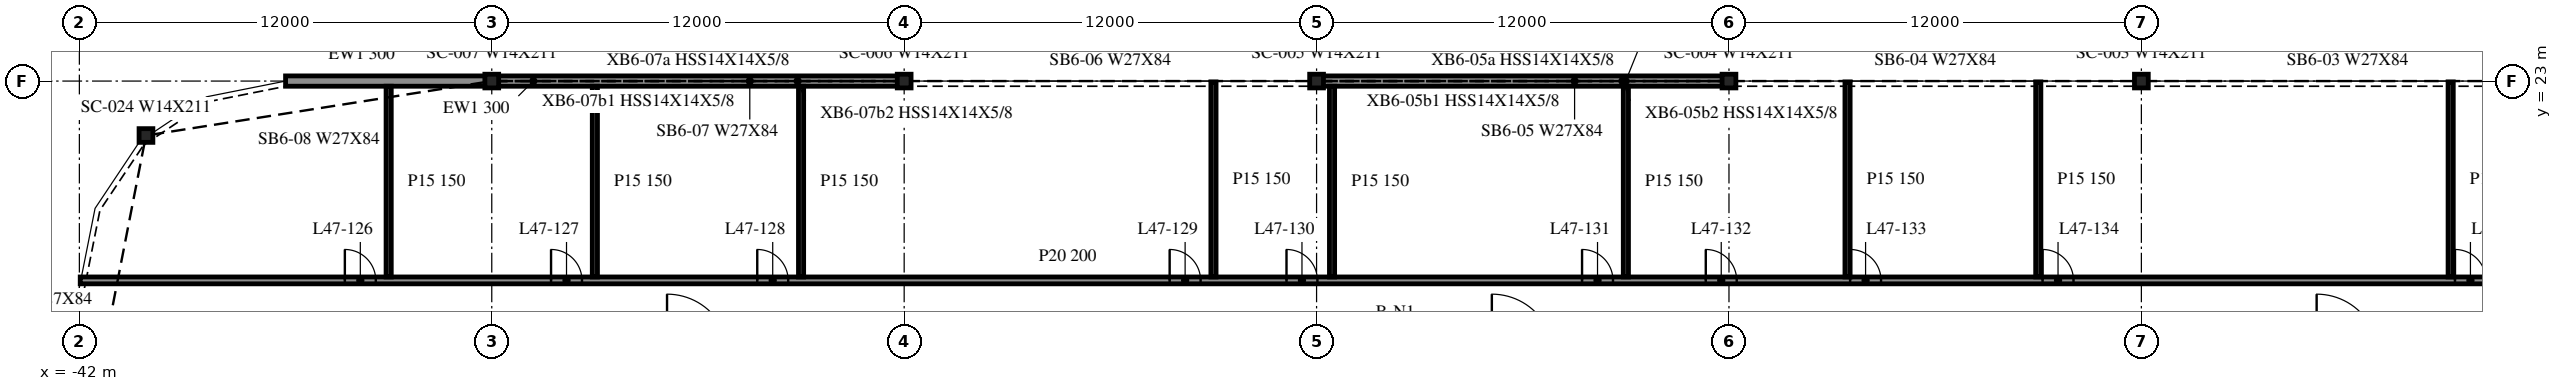
"""IFC4 building model, lengths in metres.
Left out: names, types, materials, properties, quantities, classifications, styles, units other than length and angle.
Written with IfcOpenShell. Run it as: python <this file> out.ifc"""

import sys

from ifc_helpers import new_model, si_unit, direction, frame, frame_2d, origin, origin_2d, place, context, subcontext, project, spatial, rectangle, i_section, extrude, element, fill, save


model = new_model("IFC4")
c1 = context("Model", 3, precision=1e-05, world=origin(), true_north=direction((0.0, 1.0)))
c2 = subcontext(c1, "Body", "Model", "MODEL_VIEW")
j1 = project(units=[si_unit("LENGTHUNIT", "METRE"), si_unit("PLANEANGLEUNIT", "RADIAN")], contexts=[c1])
p1 = place(None, origin())
s1 = spatial("IfcSite", under=j1, at=p1, CompositionType="ELEMENT")
p2 = place(p1, origin())
s2 = spatial("IfcBuilding", under=s1, at=p2, CompositionType="ELEMENT")
p3 = place(p2, frame((0.0, 0.0, 197.7)))
s3 = spatial("IfcBuildingStorey", under=s2, at=p3, CompositionType="ELEMENT", Elevation=197.7)
for number, where, z_axis, x_axis in (
    (1, (18.0, 23.0, -0.34), (0.0, 0.0, 1.0), (1.0, 0.0, 0.0)),
    (2, (6.0, 23.0, -0.34), (0.0, 0.0, 1.0), (1.0, 0.0, 0.0)),
    (3, (-6.0, 23.0, -0.34), (0.0, 0.0, 1.0), (1.0, 0.0, 0.0)),
    (4, (-18.0, 23.0, -0.34), (0.0, 0.0, 1.0), (1.0, 0.0, 0.0)),
    (5, (-30.0, 23.0, -0.34), (0.0, 0.0, 1.0), (1.0, 0.0, 0.0)),
    (6, (-40.062, 21.416, -0.34), (0.0, 0.0, 1.0), (1.0, 0.0, 0.0)),
):
    element("IfcColumn", number, at=place(p3, frame(where, z_axis=z_axis, x_axis=x_axis)), inside=s3, PredefinedType="COLUMN", context=c2, shape_type="SweptSolid", body=[
        extrude(i_section(OverallWidth=0.401, OverallDepth=0.399, WebThickness=0.025, FlangeThickness=0.04, at=origin_2d()), origin(), (0.0, 0.0, 1.0), 3.8),
    ])
for number, where, z_axis, x_axis in (
    (7, (5.988, 23.0, 0.0), (0.0, 0.0, 1.0), (-1.0, 0.0, 0.0)),
    (8, (-18.012, 23.0, 0.0), (0.0, 0.0, 1.0), (-1.0, 0.0, 0.0)),
):
    element("IfcWall", number, at=place(p3, frame(where, z_axis=z_axis, x_axis=x_axis)), inside=s3, PredefinedType="NOTDEFINED", context=c2, shape_type="SweptSolid", body=[
        extrude(rectangle(XDim=11.975, YDim=0.3, at=frame_2d((5.988, 0.0))), origin(), (0.0, 0.0, 1.0), 2.782),
    ])
p4 = place(p3, frame((-30.012, 23.0, 0.0), z_axis=(0.0, 0.0, 1.0), x_axis=(-1.0, 0.0, 0.0)))
e9 = element("IfcWall", 9, at=p4, inside=s3, PredefinedType="NOTDEFINED", context=c2, shape_type="SweptSolid", body=[
    extrude(rectangle(XDim=5.988, YDim=0.3, at=frame_2d((2.994, 0.0))), origin(), (0.0, 0.0, 1.0), 2.782),
])
p5 = place(p3, frame((-41.975, 17.2, 0.0), z_axis=(0.0, 0.0, 1.0), x_axis=(1.0, 0.0, 0.0)))
e10 = element("IfcWall", 10, at=p5, inside=s3, PredefinedType="PARTITIONING", context=c2, shape_type="SweptSolid", body=[
    extrude(rectangle(XDim=95.782, YDim=0.2, at=frame_2d((47.891, 0.0))), origin(), (0.0, 0.0, 1.0), 3.46),
])
p6 = place(p5, frame((7.7, 0.0, 0.0)))
e11 = element("IfcOpeningElement", 11, at=p6, cuts=e10, PredefinedType="OPENING", context=c2, shape_type="SweptSolid", body=[
    extrude(rectangle(XDim=0.9, YDim=2.1, at=frame_2d((0.45, 1.05))), frame((0.0, 0.11, 0.0), z_axis=(0.0, -1.0, 0.0), x_axis=(1.0, 0.0, 0.0)), (0.0, 0.0, 1.0), 0.22),
])
p7 = place(p5, frame((13.7, 0.0, 0.0)))
e12 = element("IfcOpeningElement", 12, at=p7, cuts=e10, PredefinedType="OPENING", context=c2, shape_type="SweptSolid", body=[
    extrude(rectangle(XDim=0.9, YDim=2.1, at=frame_2d((0.45, 1.05))), frame((0.0, 0.11, 0.0), z_axis=(0.0, -1.0, 0.0), x_axis=(1.0, 0.0, 0.0)), (0.0, 0.0, 1.0), 0.22),
])
p8 = place(p5, frame((19.7, 0.0, 0.0)))
e13 = element("IfcOpeningElement", 13, at=p8, cuts=e10, PredefinedType="OPENING", context=c2, shape_type="SweptSolid", body=[
    extrude(rectangle(XDim=0.9, YDim=2.1, at=frame_2d((0.45, 1.05))), frame((0.0, 0.11, 0.0), z_axis=(0.0, -1.0, 0.0), x_axis=(1.0, 0.0, 0.0)), (0.0, 0.0, 1.0), 0.22),
])
p9 = place(p5, frame((31.7, 0.0, 0.0)))
e14 = element("IfcOpeningElement", 14, at=p9, cuts=e10, PredefinedType="OPENING", context=c2, shape_type="SweptSolid", body=[
    extrude(rectangle(XDim=0.9, YDim=2.1, at=frame_2d((0.45, 1.05))), frame((0.0, 0.11, 0.0), z_axis=(0.0, -1.0, 0.0), x_axis=(1.0, 0.0, 0.0)), (0.0, 0.0, 1.0), 0.22),
])
p10 = place(p5, frame((35.1, 0.0, 0.0)))
e15 = element("IfcOpeningElement", 15, at=p10, cuts=e10, PredefinedType="OPENING", context=c2, shape_type="SweptSolid", body=[
    extrude(rectangle(XDim=0.9, YDim=2.1, at=frame_2d((0.45, 1.05))), frame((0.0, 0.11, 0.0), z_axis=(0.0, -1.0, 0.0), x_axis=(1.0, 0.0, 0.0)), (0.0, 0.0, 1.0), 0.22),
])
p11 = place(p5, frame((43.7, 0.0, 0.0)))
e16 = element("IfcOpeningElement", 16, at=p11, cuts=e10, PredefinedType="OPENING", context=c2, shape_type="SweptSolid", body=[
    extrude(rectangle(XDim=0.9, YDim=2.1, at=frame_2d((0.45, 1.05))), frame((0.0, 0.11, 0.0), z_axis=(0.0, -1.0, 0.0), x_axis=(1.0, 0.0, 0.0)), (0.0, 0.0, 1.0), 0.22),
])
p12 = place(p5, frame((47.3, 0.0, 0.0)))
e17 = element("IfcOpeningElement", 17, at=p12, cuts=e10, PredefinedType="OPENING", context=c2, shape_type="SweptSolid", body=[
    extrude(rectangle(XDim=0.9, YDim=2.1, at=frame_2d((0.45, 1.05))), frame((0.0, 0.11, 0.0), z_axis=(0.0, -1.0, 0.0), x_axis=(1.0, 0.0, 0.0)), (0.0, 0.0, 1.0), 0.22),
])
p13 = place(p5, frame((51.5, 0.0, 0.0)))
e18 = element("IfcOpeningElement", 18, at=p13, cuts=e10, PredefinedType="OPENING", context=c2, shape_type="SweptSolid", body=[
    extrude(rectangle(XDim=0.9, YDim=2.1, at=frame_2d((0.45, 1.05))), frame((0.0, 0.11, 0.0), z_axis=(0.0, -1.0, 0.0), x_axis=(1.0, 0.0, 0.0)), (0.0, 0.0, 1.0), 0.22),
])
p14 = place(p5, frame((57.1, 0.0, 0.0)))
e19 = element("IfcOpeningElement", 19, at=p14, cuts=e10, PredefinedType="OPENING", context=c2, shape_type="SweptSolid", body=[
    extrude(rectangle(XDim=0.9, YDim=2.1, at=frame_2d((0.45, 1.05))), frame((0.0, 0.11, 0.0), z_axis=(0.0, -1.0, 0.0), x_axis=(1.0, 0.0, 0.0)), (0.0, 0.0, 1.0), 0.22),
])
p15 = place(p5, frame((69.1, 0.0, 0.0)))
e20 = element("IfcOpeningElement", 20, at=p15, cuts=e10, PredefinedType="OPENING", context=c2, shape_type="SweptSolid", body=[
    extrude(rectangle(XDim=0.9, YDim=2.1, at=frame_2d((0.45, 1.05))), frame((0.0, 0.11, 0.0), z_axis=(0.0, -1.0, 0.0), x_axis=(1.0, 0.0, 0.0)), (0.0, 0.0, 1.0), 0.22),
])
p16 = place(p5, frame((72.5, 0.0, 0.0)))
e21 = element("IfcOpeningElement", 21, at=p16, cuts=e10, PredefinedType="OPENING", context=c2, shape_type="SweptSolid", body=[
    extrude(rectangle(XDim=0.9, YDim=2.1, at=frame_2d((0.45, 1.05))), frame((0.0, 0.11, 0.0), z_axis=(0.0, -1.0, 0.0), x_axis=(1.0, 0.0, 0.0)), (0.0, 0.0, 1.0), 0.22),
])
p17 = place(p5, frame((81.1, 0.0, 0.0)))
e22 = element("IfcOpeningElement", 22, at=p17, cuts=e10, PredefinedType="OPENING", context=c2, shape_type="SweptSolid", body=[
    extrude(rectangle(XDim=0.9, YDim=2.1, at=frame_2d((0.45, 1.05))), frame((0.0, 0.11, 0.0), z_axis=(0.0, -1.0, 0.0), x_axis=(1.0, 0.0, 0.0)), (0.0, 0.0, 1.0), 0.22),
])
p18 = place(p5, frame((87.1, 0.0, 0.0)))
e23 = element("IfcOpeningElement", 23, at=p18, cuts=e10, PredefinedType="OPENING", context=c2, shape_type="SweptSolid", body=[
    extrude(rectangle(XDim=0.9, YDim=2.1, at=frame_2d((0.45, 1.05))), frame((0.0, 0.11, 0.0), z_axis=(0.0, -1.0, 0.0), x_axis=(1.0, 0.0, 0.0)), (0.0, 0.0, 1.0), 0.22),
])
for number, where, z_axis, x_axis in (
    (24, (-33.0, 17.3, 0.0), (0.0, 0.0, 1.0), (0.0, 1.0, 0.0)),
    (25, (-27.0, 17.3, 0.0), (0.0, 0.0, 1.0), (0.0, 1.0, 0.0)),
    (26, (-21.0, 17.3, 0.0), (0.0, 0.0, 1.0), (0.0, 1.0, 0.0)),
):
    element("IfcWall", number, at=place(p3, frame(where, z_axis=z_axis, x_axis=x_axis)), inside=s3, PredefinedType="PARTITIONING", context=c2, shape_type="SweptSolid", body=[
        extrude(rectangle(XDim=5.55, YDim=0.15, at=frame_2d((2.775, 0.0))), origin(), (0.0, 0.0, 1.0), 3.46),
    ])
p19 = place(p3, frame((-9.0, 17.3, 0.0), z_axis=(0.0, 0.0, 1.0), x_axis=(0.0, 1.0, 0.0)))
e27 = element("IfcWall", 27, at=p19, inside=s3, PredefinedType="PARTITIONING", context=c2, shape_type="SweptSolid", body=[
    extrude(rectangle(XDim=5.675, YDim=0.15, at=frame_2d((2.837, 0.0))), origin(), (0.0, 0.0, 1.0), 3.46),
])
for number, where, z_axis, x_axis in (
    (28, (-5.55, 17.3, 0.0), (0.0, 0.0, 1.0), (0.0, 1.0, 0.0)),
    (29, (3.0, 17.3, 0.0), (0.0, 0.0, 1.0), (0.0, 1.0, 0.0)),
):
    element("IfcWall", number, at=place(p3, frame(where, z_axis=z_axis, x_axis=x_axis)), inside=s3, PredefinedType="PARTITIONING", context=c2, shape_type="SweptSolid", body=[
        extrude(rectangle(XDim=5.55, YDim=0.15, at=frame_2d((2.775, 0.0))), origin(), (0.0, 0.0, 1.0), 3.46),
    ])
for number, where, z_axis, x_axis in (
    (30, (9.45, 17.3, 0.0), (0.0, 0.0, 1.0), (0.0, 1.0, 0.0)),
    (31, (15.0, 17.3, 0.0), (0.0, 0.0, 1.0), (0.0, 1.0, 0.0)),
    (32, (27.0, 17.3, 0.0), (0.0, 0.0, 1.0), (0.0, 1.0, 0.0)),
):
    element("IfcWall", number, at=place(p3, frame(where, z_axis=z_axis, x_axis=x_axis)), inside=s3, PredefinedType="PARTITIONING", context=c2, shape_type="SweptSolid", body=[
        extrude(rectangle(XDim=5.675, YDim=0.15, at=frame_2d((2.837, 0.0))), origin(), (0.0, 0.0, 1.0), 3.46),
    ])
p20 = place(p6, origin())
e33 = element("IfcDoor", 33, at=p20, inside=s3, OperationType="SINGLE_SWING_LEFT", PredefinedType="DOOR", context=c2, shape_type="SweptSolid", body=[
    extrude(rectangle(XDim=0.9, YDim=2.1, at=frame_2d((0.45, 1.05))), frame((0.0, 0.025, 0.0), z_axis=(0.0, -1.0, 0.0), x_axis=(1.0, 0.0, 0.0)), (0.0, 0.0, 1.0), 0.05),
])
fill(e11, e33)
p21 = place(p7, origin())
e34 = element("IfcDoor", 34, at=p21, inside=s3, OperationType="SINGLE_SWING_LEFT", PredefinedType="DOOR", context=c2, shape_type="SweptSolid", body=[
    extrude(rectangle(XDim=0.9, YDim=2.1, at=frame_2d((0.45, 1.05))), frame((0.0, 0.025, 0.0), z_axis=(0.0, -1.0, 0.0), x_axis=(1.0, 0.0, 0.0)), (0.0, 0.0, 1.0), 0.05),
])
fill(e12, e34)
p22 = place(p8, origin())
e35 = element("IfcDoor", 35, at=p22, inside=s3, OperationType="SINGLE_SWING_LEFT", PredefinedType="DOOR", context=c2, shape_type="SweptSolid", body=[
    extrude(rectangle(XDim=0.9, YDim=2.1, at=frame_2d((0.45, 1.05))), frame((0.0, 0.025, 0.0), z_axis=(0.0, -1.0, 0.0), x_axis=(1.0, 0.0, 0.0)), (0.0, 0.0, 1.0), 0.05),
])
fill(e13, e35)
p23 = place(p9, origin())
e36 = element("IfcDoor", 36, at=p23, inside=s3, OperationType="SINGLE_SWING_LEFT", PredefinedType="DOOR", context=c2, shape_type="SweptSolid", body=[
    extrude(rectangle(XDim=0.9, YDim=2.1, at=frame_2d((0.45, 1.05))), frame((0.0, 0.025, 0.0), z_axis=(0.0, -1.0, 0.0), x_axis=(1.0, 0.0, 0.0)), (0.0, 0.0, 1.0), 0.05),
])
fill(e14, e36)
p24 = place(p10, origin())
e37 = element("IfcDoor", 37, at=p24, inside=s3, OperationType="SINGLE_SWING_LEFT", PredefinedType="DOOR", context=c2, shape_type="SweptSolid", body=[
    extrude(rectangle(XDim=0.9, YDim=2.1, at=frame_2d((0.45, 1.05))), frame((0.0, 0.025, 0.0), z_axis=(0.0, -1.0, 0.0), x_axis=(1.0, 0.0, 0.0)), (0.0, 0.0, 1.0), 0.05),
])
fill(e15, e37)
p25 = place(p11, origin())
e38 = element("IfcDoor", 38, at=p25, inside=s3, OperationType="SINGLE_SWING_LEFT", PredefinedType="DOOR", context=c2, shape_type="SweptSolid", body=[
    extrude(rectangle(XDim=0.9, YDim=2.1, at=frame_2d((0.45, 1.05))), frame((0.0, 0.025, 0.0), z_axis=(0.0, -1.0, 0.0), x_axis=(1.0, 0.0, 0.0)), (0.0, 0.0, 1.0), 0.05),
])
fill(e16, e38)
p26 = place(p12, origin())
e39 = element("IfcDoor", 39, at=p26, inside=s3, OperationType="SINGLE_SWING_LEFT", PredefinedType="DOOR", context=c2, shape_type="SweptSolid", body=[
    extrude(rectangle(XDim=0.9, YDim=2.1, at=frame_2d((0.45, 1.05))), frame((0.0, 0.025, 0.0), z_axis=(0.0, -1.0, 0.0), x_axis=(1.0, 0.0, 0.0)), (0.0, 0.0, 1.0), 0.05),
])
fill(e17, e39)
p27 = place(p13, origin())
e40 = element("IfcDoor", 40, at=p27, inside=s3, OperationType="SINGLE_SWING_RIGHT", PredefinedType="DOOR", context=c2, shape_type="SweptSolid", body=[
    extrude(rectangle(XDim=0.9, YDim=2.1, at=frame_2d((0.45, 1.05))), frame((0.0, 0.025, 0.0), z_axis=(0.0, -1.0, 0.0), x_axis=(1.0, 0.0, 0.0)), (0.0, 0.0, 1.0), 0.05),
])
fill(e18, e40)
p28 = place(p14, origin())
e41 = element("IfcDoor", 41, at=p28, inside=s3, OperationType="SINGLE_SWING_RIGHT", PredefinedType="DOOR", context=c2, shape_type="SweptSolid", body=[
    extrude(rectangle(XDim=0.9, YDim=2.1, at=frame_2d((0.45, 1.05))), frame((0.0, 0.025, 0.0), z_axis=(0.0, -1.0, 0.0), x_axis=(1.0, 0.0, 0.0)), (0.0, 0.0, 1.0), 0.05),
])
fill(e19, e41)
p29 = place(p15, origin())
e42 = element("IfcDoor", 42, at=p29, inside=s3, OperationType="SINGLE_SWING_RIGHT", PredefinedType="DOOR", context=c2, shape_type="SweptSolid", body=[
    extrude(rectangle(XDim=0.9, YDim=2.1, at=frame_2d((0.45, 1.05))), frame((0.0, 0.025, 0.0), z_axis=(0.0, -1.0, 0.0), x_axis=(1.0, 0.0, 0.0)), (0.0, 0.0, 1.0), 0.05),
])
fill(e20, e42)
save(model, sys.argv[1])
